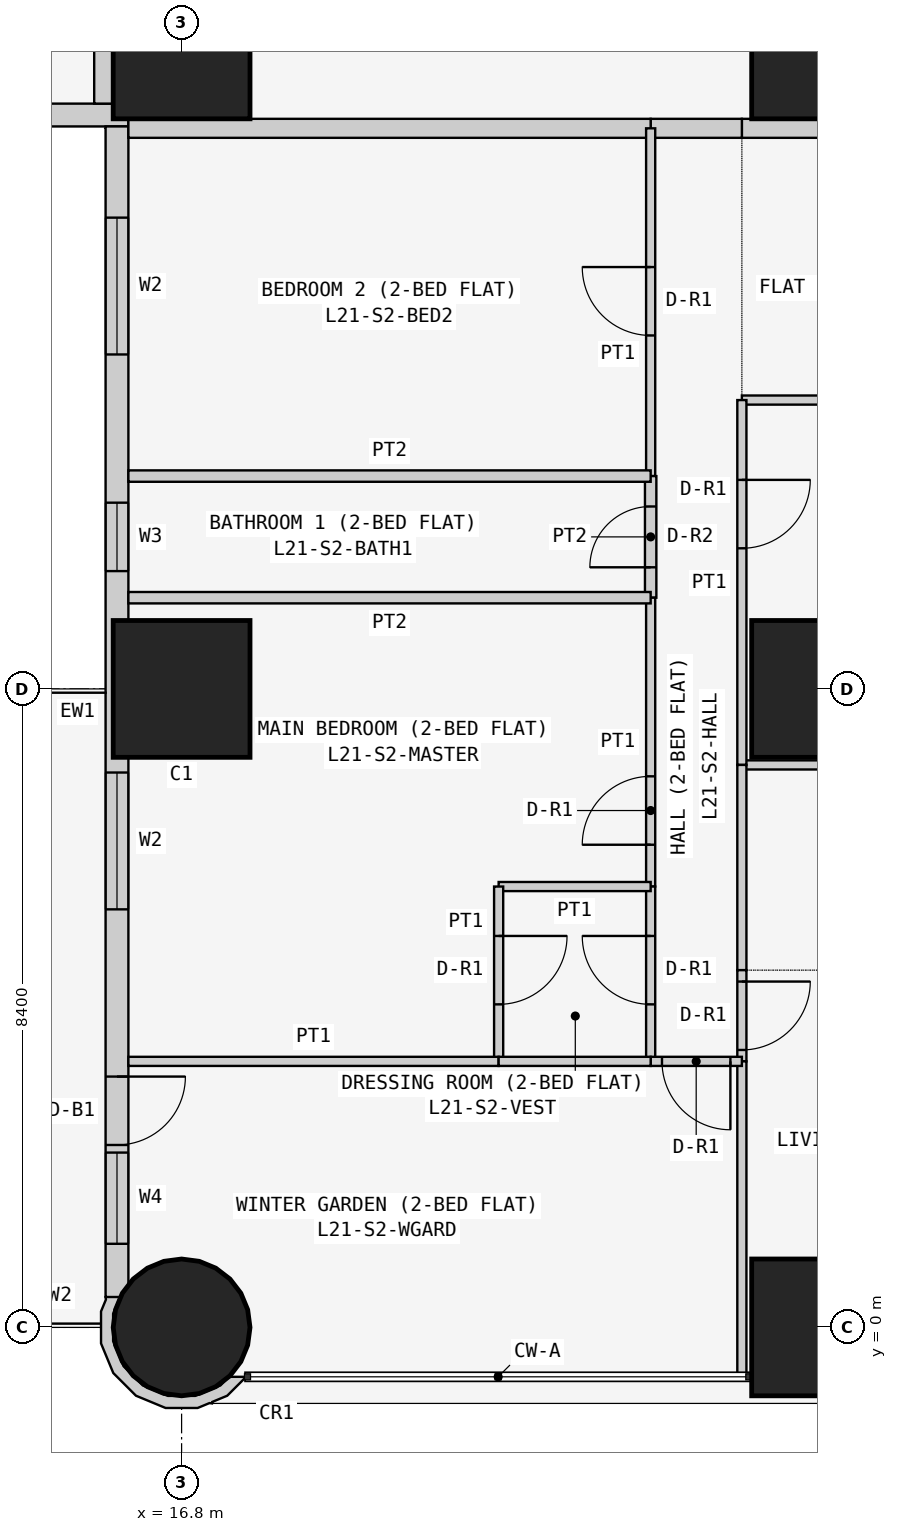
"""IFC4 building model, lengths in metres.
Left out: names, types, materials, properties, quantities, classifications, styles, units other than length and angle.
Written with IfcOpenShell. Run it as: python <this file> out.ifc"""

import sys

from ifc_helpers import new_model, si_unit, direction, frame, frame_2d, origin, origin_2d, place, context, subcontext, project, spatial, polyline, rectangle, circle, outline, extrude, element, fill, save


model = new_model("IFC4")
c1 = context("Model", 3, precision=1e-05, world=origin(), true_north=direction((0.0, 1.0)))
c2 = subcontext(c1, "Body", "Model", "MODEL_VIEW")
j1 = project(units=[si_unit("LENGTHUNIT", "METRE"), si_unit("PLANEANGLEUNIT", "RADIAN")], contexts=[c1])
p1 = place(None, origin())
s1 = spatial("IfcSite", under=j1, at=p1, CompositionType="ELEMENT")
p2 = place(p1, origin())
s2 = spatial("IfcBuilding", under=s1, at=p2, CompositionType="ELEMENT")
p3 = place(p2, frame((0.0, 0.0, 84.9)))
s3 = spatial("IfcBuildingStorey", under=s2, at=p3, CompositionType="ELEMENT", Elevation=84.9)
p4 = place(p3, frame((16.8, 0.0, 0.0), z_axis=(0.0, 0.0, 1.0), x_axis=(1.0, 0.0, 0.0)))
e1 = element("IfcColumn", 1, at=p4, inside=s3, PredefinedType="COLUMN", context=c2, shape_type="SweptSolid", body=[
    extrude(circle(Radius=0.9, at=origin_2d()), origin(), (0.0, 0.0, 1.0), 3.6),
])
for number, where, z_axis, x_axis in (
    (2, (16.8, 8.4, 0.0), (0.0, 0.0, 1.0), (1.0, 0.0, 0.0)),
    (3, (16.8, 16.8, 0.0), (0.0, 0.0, 1.0), (1.0, 0.0, 0.0)),
    (4, (25.2, 0.0, 0.0), (0.0, 0.0, 1.0), (1.0, 0.0, 0.0)),
    (5, (25.2, 8.4, 0.0), (0.0, 0.0, 1.0), (1.0, 0.0, 0.0)),
    (6, (25.2, 16.8, 0.0), (0.0, 0.0, 1.0), (1.0, 0.0, 0.0)),
):
    element("IfcColumn", number, at=place(p3, frame(where, z_axis=z_axis, x_axis=x_axis)), inside=s3, PredefinedType="COLUMN", context=c2, shape_type="SweptSolid", body=[
        extrude(rectangle(XDim=1.8, YDim=1.8, at=origin_2d()), origin(), (0.0, 0.0, 1.0), 3.6),
    ])
p5 = place(p3, frame((0.4, 15.95, 0.0), z_axis=(0.0, 0.0, 1.0), x_axis=(1.0, 0.0, 0.0)))
e7 = element("IfcWall", 7, at=p5, inside=s3, PredefinedType="SOLIDWALL", context=c2, shape_type="SweptSolid", body=[
    extrude(rectangle(XDim=15.7, YDim=0.3, at=frame_2d((7.85, 0.0))), origin(), (0.0, 0.0, 1.0), 3.45),
])
p6 = place(p5, frame((12.4, 0.0, 0.9)))
e8 = element("IfcOpeningElement", 8, at=p6, cuts=e7, PredefinedType="OPENING", context=c2, shape_type="SweptSolid", body=[
    extrude(rectangle(XDim=1.8, YDim=1.5, at=frame_2d((0.9, 0.75))), frame((0.0, 0.16, 0.0), z_axis=(0.0, -1.0, 0.0), x_axis=(1.0, 0.0, 0.0)), (0.0, 0.0, 1.0), 0.32),
])
p7 = place(p5, frame((9.55, 0.0, 1.5)))
e9 = element("IfcOpeningElement", 9, at=p7, cuts=e7, PredefinedType="OPENING", context=c2, shape_type="SweptSolid", body=[
    extrude(rectangle(XDim=0.9, YDim=0.7, at=frame_2d((0.45, 0.35))), frame((0.0, 0.16, 0.0), z_axis=(0.0, -1.0, 0.0), x_axis=(1.0, 0.0, 0.0)), (0.0, 0.0, 1.0), 0.32),
])
p8 = place(p5, frame((5.1, 0.0, 0.9)))
e10 = element("IfcOpeningElement", 10, at=p8, cuts=e7, PredefinedType="OPENING", context=c2, shape_type="SweptSolid", body=[
    extrude(rectangle(XDim=1.8, YDim=1.5, at=frame_2d((0.9, 0.75))), frame((0.0, 0.16, 0.0), z_axis=(0.0, -1.0, 0.0), x_axis=(1.0, 0.0, 0.0)), (0.0, 0.0, 1.0), 0.32),
])
p9 = place(p5, frame((2.0, 0.0, 0.0)))
e11 = element("IfcOpeningElement", 11, at=p9, cuts=e7, PredefinedType="OPENING", context=c2, shape_type="SweptSolid", body=[
    extrude(rectangle(XDim=0.9, YDim=2.4, at=frame_2d((0.45, 1.2))), frame((0.0, 0.16, 0.0), z_axis=(0.0, -1.0, 0.0), x_axis=(1.0, 0.0, 0.0)), (0.0, 0.0, 1.0), 0.32),
])
p10 = place(p5, frame((0.7, 0.0, 0.9)))
e12 = element("IfcOpeningElement", 12, at=p10, cuts=e7, PredefinedType="OPENING", context=c2, shape_type="SweptSolid", body=[
    extrude(rectangle(XDim=1.2, YDim=1.5, at=frame_2d((0.6, 0.75))), frame((0.0, 0.16, 0.0), z_axis=(0.0, -1.0, 0.0), x_axis=(1.0, 0.0, 0.0)), (0.0, 0.0, 1.0), 0.32),
])
p11 = place(p3, frame((15.95, 15.8, 0.0), z_axis=(0.0, 0.0, 1.0), x_axis=(0.0, -1.0, 0.0)))
e13 = element("IfcWall", 13, at=p11, inside=s3, PredefinedType="SOLIDWALL", context=c2, shape_type="SweptSolid", body=[
    extrude(rectangle(XDim=15.4, YDim=0.3, at=frame_2d((7.7, 0.0))), origin(), (0.0, 0.0, 1.0), 3.45),
])
p12 = place(p11, frame((1.2, 0.0, 0.9)))
e14 = element("IfcOpeningElement", 14, at=p12, cuts=e13, PredefinedType="OPENING", context=c2, shape_type="SweptSolid", body=[
    extrude(rectangle(XDim=1.8, YDim=1.5, at=frame_2d((0.9, 0.75))), frame((0.0, 0.16, 0.0), z_axis=(0.0, -1.0, 0.0), x_axis=(1.0, 0.0, 0.0)), (0.0, 0.0, 1.0), 0.32),
])
p13 = place(p11, frame((4.95, 0.0, 1.5)))
e15 = element("IfcOpeningElement", 15, at=p13, cuts=e13, PredefinedType="OPENING", context=c2, shape_type="SweptSolid", body=[
    extrude(rectangle(XDim=0.9, YDim=0.7, at=frame_2d((0.45, 0.35))), frame((0.0, 0.16, 0.0), z_axis=(0.0, -1.0, 0.0), x_axis=(1.0, 0.0, 0.0)), (0.0, 0.0, 1.0), 0.32),
])
p14 = place(p11, frame((8.5, 0.0, 0.9)))
e16 = element("IfcOpeningElement", 16, at=p14, cuts=e13, PredefinedType="OPENING", context=c2, shape_type="SweptSolid", body=[
    extrude(rectangle(XDim=1.8, YDim=1.5, at=frame_2d((0.9, 0.75))), frame((0.0, 0.16, 0.0), z_axis=(0.0, -1.0, 0.0), x_axis=(1.0, 0.0, 0.0)), (0.0, 0.0, 1.0), 0.32),
])
p15 = place(p11, frame((12.5, 0.0, 0.0)))
e17 = element("IfcOpeningElement", 17, at=p15, cuts=e13, PredefinedType="OPENING", context=c2, shape_type="SweptSolid", body=[
    extrude(rectangle(XDim=0.9, YDim=2.4, at=frame_2d((0.45, 1.2))), frame((0.0, 0.16, 0.0), z_axis=(0.0, -1.0, 0.0), x_axis=(1.0, 0.0, 0.0)), (0.0, 0.0, 1.0), 0.32),
])
p16 = place(p11, frame((13.5, 0.0, 0.9)))
e18 = element("IfcOpeningElement", 18, at=p16, cuts=e13, PredefinedType="OPENING", context=c2, shape_type="SweptSolid", body=[
    extrude(rectangle(XDim=1.2, YDim=1.5, at=frame_2d((0.6, 0.75))), frame((0.0, 0.16, 0.0), z_axis=(0.0, -1.0, 0.0), x_axis=(1.0, 0.0, 0.0)), (0.0, 0.0, 1.0), 0.32),
])
p17 = place(p3, frame((15.89, 0.364, 0.0), z_axis=(0.0, 0.0, 1.0), x_axis=(-0.377204953059, -0.926129809145, 0.0)))
e19 = element("IfcWall", 19, at=p17, inside=s3, PredefinedType="SOLIDWALL", context=c2, shape_type="SweptSolid", body=[
    extrude(outline(polyline([(0.36, 1.803), (0.509, 1.741), (0.761, 1.486), (0.896, 1.154), (0.894, 0.795), (0.755, 0.465), (0.5, 0.213), (0.168, 0.078), (-0.1, 0.08), (0.001, -0.097), (0.03, -0.08), (0.199, -0.081), (0.589, 0.078), (0.889, 0.374), (1.053, 0.763), (1.055, 1.185), (0.896, 1.575), (0.778, 1.695), (0.769, 1.728), (0.75, 1.723), (0.6, 1.875), (0.295, 2.004), (0.281, 1.998), (0.36, 1.803)])), origin(), (0.0, 0.0, 1.0), 3.45),
])
p18 = place(p3, frame((29.4, 15.775, 0.0), z_axis=(0.0, 0.0, 1.0), x_axis=(-1.0, 0.0, 0.0)))
e20 = element("IfcWall", 20, at=p18, inside=s3, PredefinedType="PARTITIONING", context=c2, shape_type="SweptSolid", body=[
    extrude(rectangle(XDim=5.229, YDim=0.25, at=frame_2d((2.615, 0.0))), origin(), (0.0, 0.0, 1.0), 3.45),
])
p19 = place(p18, frame((2.1, 0.0, 0.0)))
e21 = element("IfcOpeningElement", 21, at=p19, cuts=e20, PredefinedType="OPENING", context=c2, shape_type="SweptSolid", body=[
    extrude(rectangle(XDim=1.0, YDim=2.1, at=frame_2d((0.5, 1.05))), frame((0.0, 0.135, 0.0), z_axis=(0.0, -1.0, 0.0), x_axis=(1.0, 0.0, 0.0)), (0.0, 0.0, 1.0), 0.27),
])
p20 = place(p3, frame((24.171, 15.775, 0.0), z_axis=(0.0, 0.0, 1.0), x_axis=(-1.0, 0.0, 0.0)))
e22 = element("IfcWall", 22, at=p20, inside=s3, PredefinedType="PARTITIONING", context=c2, shape_type="SweptSolid", body=[
    extrude(rectangle(XDim=1.2, YDim=0.25, at=frame_2d((0.6, 0.0))), origin(), (0.0, 0.0, 1.0), 3.45),
])
p21 = place(p3, frame((22.971, 15.775, 0.0), z_axis=(0.0, 0.0, 1.0), x_axis=(-1.0, 0.0, 0.0)))
e23 = element("IfcWall", 23, at=p21, inside=s3, PredefinedType="PARTITIONING", context=c2, shape_type="SweptSolid", body=[
    extrude(rectangle(XDim=6.871, YDim=0.25, at=frame_2d((3.436, 0.0))), origin(), (0.0, 0.0, 1.0), 3.45),
])
p22 = place(p3, frame((15.775, 16.1, 0.0), z_axis=(0.0, 0.0, 1.0), x_axis=(0.0, 1.0, 0.0)))
e24 = element("IfcWall", 24, at=p22, inside=s3, PredefinedType="PARTITIONING", context=c2, shape_type="SweptSolid", body=[
    extrude(rectangle(XDim=6.471, YDim=0.25, at=frame_2d((3.235, 0.0))), origin(), (0.0, 0.0, 1.0), 3.45),
])
for number, where, z_axis, x_axis in (
    (25, (29.4, 12.2, 0.0), (0.0, 0.0, 1.0), (-1.0, 0.0, 0.0)),
    (26, (29.4, 7.4, 0.0), (0.0, 0.0, 1.0), (-1.0, 0.0, 0.0)),
):
    element("IfcWall", number, at=place(p3, frame(where, z_axis=z_axis, x_axis=x_axis)), inside=s3, PredefinedType="PARTITIONING", context=c2, shape_type="SweptSolid", body=[
        extrude(rectangle(XDim=5.229, YDim=0.12, at=frame_2d((2.615, 0.0))), origin(), (0.0, 0.0, 1.0), 3.45),
    ])
p23 = place(p3, frame((24.171, 7.4, 0.0), z_axis=(0.0, 0.0, 1.0), x_axis=(0.0, 1.0, 0.0)))
e27 = element("IfcWall", 27, at=p23, inside=s3, PredefinedType="PARTITIONING", context=c2, shape_type="SweptSolid", body=[
    extrude(rectangle(XDim=4.8, YDim=0.12, at=frame_2d((2.4, 0.0))), origin(), (0.0, 0.0, 1.0), 3.45),
])
p24 = place(p23, frame((2.85, 0.0, 0.0)))
e28 = element("IfcOpeningElement", 28, at=p24, cuts=e27, PredefinedType="OPENING", context=c2, shape_type="SweptSolid", body=[
    extrude(rectangle(XDim=0.9, YDim=2.1, at=frame_2d((0.45, 1.05))), frame((0.0, 0.07, 0.0), z_axis=(0.0, -1.0, 0.0), x_axis=(1.0, 0.0, 0.0)), (0.0, 0.0, 1.0), 0.14),
])
p25 = place(p3, frame((24.171, 4.7, 0.0), z_axis=(0.0, 0.0, 1.0), x_axis=(0.0, 1.0, 0.0)))
e29 = element("IfcWall", 29, at=p25, inside=s3, PredefinedType="PARTITIONING", context=c2, shape_type="SweptSolid", body=[
    extrude(rectangle(XDim=2.7, YDim=0.12, at=frame_2d((1.35, 0.0))), origin(), (0.0, 0.0, 1.0), 3.45),
])
p26 = place(p3, frame((24.171, 3.5, 0.0), z_axis=(0.0, 0.0, 1.0), x_axis=(0.0, 1.0, 0.0)))
e30 = element("IfcWall", 30, at=p26, inside=s3, PredefinedType="PARTITIONING", context=c2, shape_type="SweptSolid", body=[
    extrude(rectangle(XDim=1.2, YDim=0.12, at=frame_2d((0.6, 0.0))), origin(), (0.0, 0.0, 1.0), 3.45),
])
p27 = place(p26, frame((0.15, 0.0, 0.0)))
e31 = element("IfcOpeningElement", 31, at=p27, cuts=e30, PredefinedType="OPENING", context=c2, shape_type="SweptSolid", body=[
    extrude(rectangle(XDim=0.9, YDim=2.1, at=frame_2d((0.45, 1.05))), frame((0.0, 0.07, 0.0), z_axis=(0.0, -1.0, 0.0), x_axis=(1.0, 0.0, 0.0)), (0.0, 0.0, 1.0), 0.14),
])
p28 = place(p3, frame((24.171, -0.65, 0.0), z_axis=(0.0, 0.0, 1.0), x_axis=(0.0, 1.0, 0.0)))
e32 = element("IfcWall", 32, at=p28, inside=s3, PredefinedType="PARTITIONING", context=c2, shape_type="SweptSolid", body=[
    extrude(rectangle(XDim=4.15, YDim=0.12, at=frame_2d((2.075, 0.0))), origin(), (0.0, 0.0, 1.0), 3.45),
])
p29 = place(p3, frame((22.971, 11.2, 0.0), z_axis=(0.0, 0.0, 1.0), x_axis=(0.0, 1.0, 0.0)))
e33 = element("IfcWall", 33, at=p29, inside=s3, PredefinedType="PARTITIONING", context=c2, shape_type="SweptSolid", body=[
    extrude(rectangle(XDim=4.575, YDim=0.12, at=frame_2d((2.288, 0.0))), origin(), (0.0, 0.0, 1.0), 3.45),
])
p30 = place(p29, frame((1.85, 0.0, 0.0)))
e34 = element("IfcOpeningElement", 34, at=p30, cuts=e33, PredefinedType="OPENING", context=c2, shape_type="SweptSolid", body=[
    extrude(rectangle(XDim=0.9, YDim=2.1, at=frame_2d((0.45, 1.05))), frame((0.0, 0.07, 0.0), z_axis=(0.0, -1.0, 0.0), x_axis=(1.0, 0.0, 0.0)), (0.0, 0.0, 1.0), 0.14),
])
p31 = place(p3, frame((22.971, 9.6, 0.0), z_axis=(0.0, 0.0, 1.0), x_axis=(0.0, 1.0, 0.0)))
e35 = element("IfcWall", 35, at=p31, inside=s3, PredefinedType="PARTITIONING", context=c2, shape_type="SweptSolid", body=[
    extrude(rectangle(XDim=1.6, YDim=0.15, at=frame_2d((0.8, 0.0))), origin(), (0.0, 0.0, 1.0), 3.45),
])
p32 = place(p31, frame((0.4, 0.0, 0.0)))
e36 = element("IfcOpeningElement", 36, at=p32, cuts=e35, PredefinedType="OPENING", context=c2, shape_type="SweptSolid", body=[
    extrude(rectangle(XDim=0.8, YDim=2.1, at=frame_2d((0.4, 1.05))), frame((0.0, 0.085, 0.0), z_axis=(0.0, -1.0, 0.0), x_axis=(1.0, 0.0, 0.0)), (0.0, 0.0, 1.0), 0.17),
])
p33 = place(p3, frame((22.971, 5.8, 0.0), z_axis=(0.0, 0.0, 1.0), x_axis=(0.0, 1.0, 0.0)))
e37 = element("IfcWall", 37, at=p33, inside=s3, PredefinedType="PARTITIONING", context=c2, shape_type="SweptSolid", body=[
    extrude(rectangle(XDim=3.8, YDim=0.12, at=frame_2d((1.9, 0.0))), origin(), (0.0, 0.0, 1.0), 3.45),
])
p34 = place(p33, frame((0.55, 0.0, 0.0)))
e38 = element("IfcOpeningElement", 38, at=p34, cuts=e37, PredefinedType="OPENING", context=c2, shape_type="SweptSolid", body=[
    extrude(rectangle(XDim=0.9, YDim=2.1, at=frame_2d((0.45, 1.05))), frame((0.0, 0.07, 0.0), z_axis=(0.0, -1.0, 0.0), x_axis=(1.0, 0.0, 0.0)), (0.0, 0.0, 1.0), 0.14),
])
p35 = place(p3, frame((22.971, 3.5, 0.0), z_axis=(0.0, 0.0, 1.0), x_axis=(0.0, 1.0, 0.0)))
e39 = element("IfcWall", 39, at=p35, inside=s3, PredefinedType="PARTITIONING", context=c2, shape_type="SweptSolid", body=[
    extrude(rectangle(XDim=2.3, YDim=0.12, at=frame_2d((1.15, 0.0))), origin(), (0.0, 0.0, 1.0), 3.45),
])
p36 = place(p35, frame((0.75, 0.0, 0.0)))
e40 = element("IfcOpeningElement", 40, at=p36, cuts=e39, PredefinedType="OPENING", context=c2, shape_type="SweptSolid", body=[
    extrude(rectangle(XDim=0.9, YDim=2.1, at=frame_2d((0.45, 1.05))), frame((0.0, 0.07, 0.0), z_axis=(0.0, -1.0, 0.0), x_axis=(1.0, 0.0, 0.0)), (0.0, 0.0, 1.0), 0.14),
])
p37 = place(p3, frame((24.171, 3.5, 0.0), z_axis=(0.0, 0.0, 1.0), x_axis=(-1.0, 0.0, 0.0)))
e41 = element("IfcWall", 41, at=p37, inside=s3, PredefinedType="PARTITIONING", context=c2, shape_type="SweptSolid", body=[
    extrude(rectangle(XDim=1.2, YDim=0.12, at=frame_2d((0.6, 0.0))), origin(), (0.0, 0.0, 1.0), 3.45),
])
p38 = place(p37, frame((0.151, 0.0, 0.0)))
e42 = element("IfcOpeningElement", 42, at=p38, cuts=e41, PredefinedType="OPENING", context=c2, shape_type="SweptSolid", body=[
    extrude(rectangle(XDim=0.9, YDim=2.1, at=frame_2d((0.45, 1.05))), frame((0.0, 0.07, 0.0), z_axis=(0.0, -1.0, 0.0), x_axis=(1.0, 0.0, 0.0)), (0.0, 0.0, 1.0), 0.14),
])
for number, where, z_axis, x_axis in (
    (43, (22.971, 11.2, 0.0), (0.0, 0.0, 1.0), (-1.0, 0.0, 0.0)),
    (44, (22.971, 9.6, 0.0), (0.0, 0.0, 1.0), (-1.0, 0.0, 0.0)),
):
    element("IfcWall", number, at=place(p3, frame(where, z_axis=z_axis, x_axis=x_axis)), inside=s3, PredefinedType="PARTITIONING", context=c2, shape_type="SweptSolid", body=[
        extrude(rectangle(XDim=6.871, YDim=0.15, at=frame_2d((3.436, 0.0))), origin(), (0.0, 0.0, 1.0), 3.45),
    ])
p39 = place(p3, frame((22.971, 5.8, 0.0), z_axis=(0.0, 0.0, 1.0), x_axis=(-1.0, 0.0, 0.0)))
e45 = element("IfcWall", 45, at=p39, inside=s3, PredefinedType="PARTITIONING", context=c2, shape_type="SweptSolid", body=[
    extrude(rectangle(XDim=2.0, YDim=0.12, at=frame_2d((1.0, 0.0))), origin(), (0.0, 0.0, 1.0), 3.45),
])
p40 = place(p3, frame((20.971, 5.8, 0.0), z_axis=(0.0, 0.0, 1.0), x_axis=(0.0, -1.0, 0.0)))
e46 = element("IfcWall", 46, at=p40, inside=s3, PredefinedType="PARTITIONING", context=c2, shape_type="SweptSolid", body=[
    extrude(rectangle(XDim=2.3, YDim=0.12, at=frame_2d((1.15, 0.0))), origin(), (0.0, 0.0, 1.0), 2.848),
])
p41 = place(p40, frame((0.65, 0.0, 0.0)))
e47 = element("IfcOpeningElement", 47, at=p41, cuts=e46, PredefinedType="OPENING", context=c2, shape_type="SweptSolid", body=[
    extrude(rectangle(XDim=0.9, YDim=2.1, at=frame_2d((0.45, 1.05))), frame((0.0, 0.07, 0.0), z_axis=(0.0, -1.0, 0.0), x_axis=(1.0, 0.0, 0.0)), (0.0, 0.0, 1.0), 0.14),
])
p42 = place(p3, frame((20.971, 3.5, 0.0), z_axis=(0.0, 0.0, 1.0), x_axis=(-1.0, 0.0, 0.0)))
e48 = element("IfcWall", 48, at=p42, inside=s3, PredefinedType="PARTITIONING", context=c2, shape_type="SweptSolid", body=[
    extrude(rectangle(XDim=4.871, YDim=0.12, at=frame_2d((2.436, 0.0))), origin(), (0.0, 0.0, 1.0), 3.45),
])
p43 = place(p3, frame((22.971, 3.5, 0.0), z_axis=(0.0, 0.0, 1.0), x_axis=(-1.0, 0.0, 0.0)))
e49 = element("IfcWall", 49, at=p43, inside=s3, PredefinedType="PARTITIONING", context=c2, shape_type="SweptSolid", body=[
    extrude(rectangle(XDim=2.0, YDim=0.12, at=frame_2d((1.0, 0.0))), origin(), (0.0, 0.0, 1.0), 3.45),
])
p44 = place(p12, origin())
e50 = element("IfcWindow", 50, at=p44, inside=s3, PartitioningType="SINGLE_PANEL", PredefinedType="WINDOW", context=c2, shape_type="SweptSolid", body=[
    extrude(rectangle(XDim=1.8, YDim=1.5, at=frame_2d((0.9, 0.75))), frame((0.0, 0.03, 0.0), z_axis=(0.0, -1.0, 0.0), x_axis=(1.0, 0.0, 0.0)), (0.0, 0.0, 1.0), 0.06),
])
fill(e14, e50)
p45 = place(p13, origin())
e51 = element("IfcWindow", 51, at=p45, inside=s3, PartitioningType="SINGLE_PANEL", PredefinedType="WINDOW", context=c2, shape_type="SweptSolid", body=[
    extrude(rectangle(XDim=0.9, YDim=0.7, at=frame_2d((0.45, 0.35))), frame((0.0, 0.03, 0.0), z_axis=(0.0, -1.0, 0.0), x_axis=(1.0, 0.0, 0.0)), (0.0, 0.0, 1.0), 0.06),
])
fill(e15, e51)
p46 = place(p14, origin())
e52 = element("IfcWindow", 52, at=p46, inside=s3, PartitioningType="SINGLE_PANEL", PredefinedType="WINDOW", context=c2, shape_type="SweptSolid", body=[
    extrude(rectangle(XDim=1.8, YDim=1.5, at=frame_2d((0.9, 0.75))), frame((0.0, 0.03, 0.0), z_axis=(0.0, -1.0, 0.0), x_axis=(1.0, 0.0, 0.0)), (0.0, 0.0, 1.0), 0.06),
])
fill(e16, e52)
p47 = place(p15, origin())
e53 = element("IfcDoor", 53, at=p47, inside=s3, OperationType="SINGLE_SWING_LEFT", PredefinedType="DOOR", context=c2, shape_type="SweptSolid", body=[
    extrude(rectangle(XDim=0.9, YDim=2.4, at=frame_2d((0.45, 1.2))), frame((0.0, 0.025, 0.0), z_axis=(0.0, -1.0, 0.0), x_axis=(1.0, 0.0, 0.0)), (0.0, 0.0, 1.0), 0.05),
])
fill(e17, e53)
p48 = place(p16, origin())
e54 = element("IfcWindow", 54, at=p48, inside=s3, PartitioningType="SINGLE_PANEL", PredefinedType="WINDOW", context=c2, shape_type="SweptSolid", body=[
    extrude(rectangle(XDim=1.2, YDim=1.5, at=frame_2d((0.6, 0.75))), frame((0.0, 0.03, 0.0), z_axis=(0.0, -1.0, 0.0), x_axis=(1.0, 0.0, 0.0)), (0.0, 0.0, 1.0), 0.06),
])
fill(e18, e54)
p49 = place(p24, frame((0.9, 0.0, 0.0), z_axis=(0.0, 0.0, 1.0), x_axis=(-1.0, 0.0, 0.0)))
e55 = element("IfcDoor", 55, at=p49, inside=s3, OperationType="SINGLE_SWING_LEFT", PredefinedType="DOOR", context=c2, shape_type="SweptSolid", body=[
    extrude(rectangle(XDim=0.9, YDim=2.1, at=frame_2d((0.45, 1.05))), frame((0.0, 0.025, 0.0), z_axis=(0.0, -1.0, 0.0), x_axis=(1.0, 0.0, 0.0)), (0.0, 0.0, 1.0), 0.05),
])
fill(e28, e55)
p50 = place(p27, frame((0.9, 0.0, 0.0), z_axis=(0.0, 0.0, 1.0), x_axis=(-1.0, 0.0, 0.0)))
e56 = element("IfcDoor", 56, at=p50, inside=s3, OperationType="SINGLE_SWING_LEFT", PredefinedType="DOOR", context=c2, shape_type="SweptSolid", body=[
    extrude(rectangle(XDim=0.9, YDim=2.1, at=frame_2d((0.45, 1.05))), frame((0.0, 0.025, 0.0), z_axis=(0.0, -1.0, 0.0), x_axis=(1.0, 0.0, 0.0)), (0.0, 0.0, 1.0), 0.05),
])
fill(e31, e56)
p51 = place(p30, origin())
e57 = element("IfcDoor", 57, at=p51, inside=s3, OperationType="SINGLE_SWING_RIGHT", PredefinedType="DOOR", context=c2, shape_type="SweptSolid", body=[
    extrude(rectangle(XDim=0.9, YDim=2.1, at=frame_2d((0.45, 1.05))), frame((0.0, 0.025, 0.0), z_axis=(0.0, -1.0, 0.0), x_axis=(1.0, 0.0, 0.0)), (0.0, 0.0, 1.0), 0.05),
])
fill(e34, e57)
p52 = place(p32, origin())
e58 = element("IfcDoor", 58, at=p52, inside=s3, OperationType="SINGLE_SWING_LEFT", PredefinedType="DOOR", context=c2, shape_type="SweptSolid", body=[
    extrude(rectangle(XDim=0.8, YDim=2.1, at=frame_2d((0.4, 1.05))), frame((0.0, 0.025, 0.0), z_axis=(0.0, -1.0, 0.0), x_axis=(1.0, 0.0, 0.0)), (0.0, 0.0, 1.0), 0.05),
])
fill(e36, e58)
p53 = place(p34, origin())
e59 = element("IfcDoor", 59, at=p53, inside=s3, OperationType="SINGLE_SWING_LEFT", PredefinedType="DOOR", context=c2, shape_type="SweptSolid", body=[
    extrude(rectangle(XDim=0.9, YDim=2.1, at=frame_2d((0.45, 1.05))), frame((0.0, 0.025, 0.0), z_axis=(0.0, -1.0, 0.0), x_axis=(1.0, 0.0, 0.0)), (0.0, 0.0, 1.0), 0.05),
])
fill(e38, e59)
p54 = place(p36, origin())
e60 = element("IfcDoor", 60, at=p54, inside=s3, OperationType="SINGLE_SWING_RIGHT", PredefinedType="DOOR", context=c2, shape_type="SweptSolid", body=[
    extrude(rectangle(XDim=0.9, YDim=2.1, at=frame_2d((0.45, 1.05))), frame((0.0, 0.025, 0.0), z_axis=(0.0, -1.0, 0.0), x_axis=(1.0, 0.0, 0.0)), (0.0, 0.0, 1.0), 0.05),
])
fill(e40, e60)
p55 = place(p41, origin())
e61 = element("IfcDoor", 61, at=p55, inside=s3, OperationType="SINGLE_SWING_LEFT", PredefinedType="DOOR", context=c2, shape_type="SweptSolid", body=[
    extrude(rectangle(XDim=0.9, YDim=2.1, at=frame_2d((0.45, 1.05))), frame((0.0, 0.025, 0.0), z_axis=(0.0, -1.0, 0.0), x_axis=(1.0, 0.0, 0.0)), (0.0, 0.0, 1.0), 0.05),
])
fill(e47, e61)
p56 = place(p38, origin())
e62 = element("IfcDoor", 62, at=p56, inside=s3, OperationType="SINGLE_SWING_LEFT", PredefinedType="DOOR", context=c2, shape_type="SweptSolid", body=[
    extrude(rectangle(XDim=0.9, YDim=2.1, at=frame_2d((0.45, 1.05))), frame((0.0, 0.025, 0.0), z_axis=(0.0, -1.0, 0.0), x_axis=(1.0, 0.0, 0.0)), (0.0, 0.0, 1.0), 0.05),
])
fill(e42, e62)
save(model, sys.argv[1])
